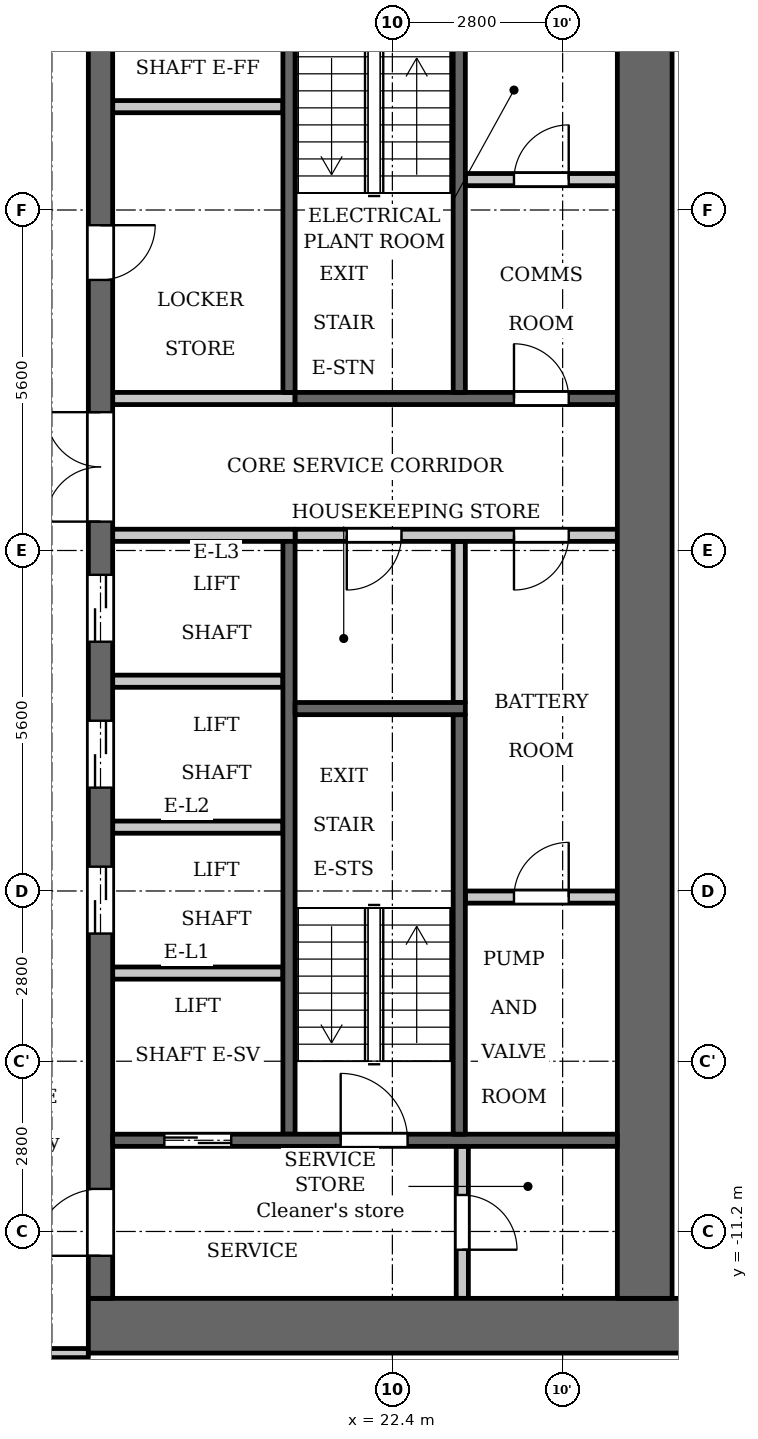
"""IFC4 building model, lengths in metres.
Left out: names, types, materials, properties, quantities, classifications, styles, units other than length and angle.
Written with IfcOpenShell. Run it as: python <this file> out.ifc"""

import sys

from ifc_helpers import new_model, si_unit, direction, frame, frame_2d, origin, place, context, subcontext, project, spatial, rectangle, extrude, element, fill, save


model = new_model("IFC4")
c1 = context("Model", 3, precision=1e-05, world=origin(), true_north=direction((0.0, 1.0)))
c2 = subcontext(c1, "Body", "Model", "MODEL_VIEW")
j1 = project(units=[si_unit("LENGTHUNIT", "METRE"), si_unit("PLANEANGLEUNIT", "RADIAN")], contexts=[c1])
p1 = place(None, origin())
s1 = spatial("IfcSite", under=j1, at=p1, CompositionType="ELEMENT")
p2 = place(p1, origin())
s2 = spatial("IfcBuilding", under=s1, at=p2, CompositionType="ELEMENT")
p3 = place(p2, frame((0.0, 0.0, 97.3)))
s3 = spatial("IfcBuildingStorey", under=s2, at=p3, CompositionType="ELEMENT", Elevation=97.3)
p4 = place(p3, frame((23.5, -2.5, 0.0), z_axis=(0.0, 0.0, 1.0), x_axis=(0.0, 1.0, 0.0)))
e1 = element("IfcWall", 1, at=p4, inside=s3, PredefinedType="PARTITIONING", context=c2, shape_type="SweptSolid", body=[
    extrude(rectangle(XDim=2.65, YDim=0.2, at=frame_2d((1.325, 0.0))), origin(), (0.0, 0.0, 1.0), 3.2),
])
p5 = place(p3, frame((20.7, 2.6, 0.0), z_axis=(0.0, 0.0, 1.0), x_axis=(0.0, 1.0, 0.0)))
e2 = element("IfcWall", 2, at=p5, inside=s3, PredefinedType="SHEAR", context=c2, shape_type="SweptSolid", body=[
    extrude(rectangle(XDim=7.0, YDim=0.2, at=frame_2d((3.5, 0.0))), origin(), (0.0, 0.0, 1.0), 3.2),
])
p6 = place(p3, frame((20.7, -9.6, 0.0), z_axis=(0.0, 0.0, 1.0), x_axis=(0.0, 1.0, 0.0)))
e3 = element("IfcWall", 3, at=p6, inside=s3, PredefinedType="SHEAR", context=c2, shape_type="SweptSolid", body=[
    extrude(rectangle(XDim=9.75, YDim=0.2, at=frame_2d((4.875, 0.0))), origin(), (0.0, 0.0, 1.0), 3.2),
])
p7 = place(p3, frame((20.8, 2.5, 0.0), z_axis=(0.0, 0.0, 1.0), x_axis=(1.0, 0.0, 0.0)))
e4 = element("IfcWall", 4, at=p7, inside=s3, PredefinedType="SHEAR", context=c2, shape_type="SweptSolid", body=[
    extrude(rectangle(XDim=5.3, YDim=0.2, at=frame_2d((2.65, 0.0))), origin(), (0.0, 0.0, 1.0), 3.2),
])
p8 = place(p7, frame((3.6, 0.0, 0.0)))
e5 = element("IfcOpeningElement", 5, at=p8, cuts=e4, PredefinedType="OPENING", context=c2, shape_type="SweptSolid", body=[
    extrude(rectangle(XDim=0.9, YDim=2.1, at=frame_2d((0.45, 1.05))), frame((0.0, 0.11, 0.0), z_axis=(0.0, -1.0, 0.0), x_axis=(1.0, 0.0, 0.0)), (0.0, 0.0, 1.0), 0.22),
])
p9 = place(p3, frame((20.8, 0.25, 0.0), z_axis=(0.0, 0.0, 1.0), x_axis=(1.0, 0.0, 0.0)))
e6 = element("IfcWall", 6, at=p9, inside=s3, PredefinedType="PARTITIONING", context=c2, shape_type="SweptSolid", body=[
    extrude(rectangle(XDim=5.3, YDim=0.2, at=frame_2d((2.65, 0.0))), origin(), (0.0, 0.0, 1.0), 3.2),
])
p10 = place(p9, frame((0.85, 0.0, 0.0)))
e7 = element("IfcOpeningElement", 7, at=p10, cuts=e6, PredefinedType="OPENING", context=c2, shape_type="SweptSolid", body=[
    extrude(rectangle(XDim=0.9, YDim=2.1, at=frame_2d((0.45, 1.05))), frame((0.0, 0.11, 0.0), z_axis=(0.0, -1.0, 0.0), x_axis=(1.0, 0.0, 0.0)), (0.0, 0.0, 1.0), 0.22),
])
p11 = place(p9, frame((3.6, 0.0, 0.0)))
e8 = element("IfcOpeningElement", 8, at=p11, cuts=e6, PredefinedType="OPENING", context=c2, shape_type="SweptSolid", body=[
    extrude(rectangle(XDim=0.9, YDim=2.1, at=frame_2d((0.45, 1.05))), frame((0.0, 0.11, 0.0), z_axis=(0.0, -1.0, 0.0), x_axis=(1.0, 0.0, 0.0)), (0.0, 0.0, 1.0), 0.22),
])
p12 = place(p3, frame((17.4, -12.75, 0.0), z_axis=(0.0, 0.0, 1.0), x_axis=(1.0, 0.0, 0.0)))
e9 = element("IfcWall", 9, at=p12, inside=s3, PredefinedType="SHEAR", context=c2, shape_type="SweptSolid", body=[
    extrude(rectangle(XDim=10.4, YDim=0.9, at=frame_2d((5.2, 0.0))), origin(), (0.0, 0.0, 1.0), 3.2),
])
p13 = place(p3, frame((17.6, -12.3, 0.0), z_axis=(0.0, 0.0, 1.0), x_axis=(0.0, 1.0, 0.0)))
e10 = element("IfcWall", 10, at=p13, inside=s3, PredefinedType="SHEAR", context=c2, shape_type="SweptSolid", body=[
    extrude(rectangle(XDim=24.6, YDim=0.4, at=frame_2d((12.3, 0.0))), origin(), (0.0, 0.0, 1.0), 3.2),
])
p14 = place(p13, frame((6.0, 0.0, 0.0)))
e11 = element("IfcOpeningElement", 11, at=p14, cuts=e10, PredefinedType="OPENING", context=c2, shape_type="SweptSolid", body=[
    extrude(rectangle(XDim=1.1, YDim=2.1, at=frame_2d((0.55, 1.05))), frame((0.0, 0.21, 0.0), z_axis=(0.0, -1.0, 0.0), x_axis=(1.0, 0.0, 0.0)), (0.0, 0.0, 1.0), 0.42),
])
p15 = place(p13, frame((8.4, 0.0, 0.0)))
e12 = element("IfcOpeningElement", 12, at=p15, cuts=e10, PredefinedType="OPENING", context=c2, shape_type="SweptSolid", body=[
    extrude(rectangle(XDim=1.1, YDim=2.1, at=frame_2d((0.55, 1.05))), frame((0.0, 0.21, 0.0), z_axis=(0.0, -1.0, 0.0), x_axis=(1.0, 0.0, 0.0)), (0.0, 0.0, 1.0), 0.42),
])
p16 = place(p13, frame((10.8, 0.0, 0.0)))
e13 = element("IfcOpeningElement", 13, at=p16, cuts=e10, PredefinedType="OPENING", context=c2, shape_type="SweptSolid", body=[
    extrude(rectangle(XDim=1.1, YDim=2.1, at=frame_2d((0.55, 1.05))), frame((0.0, 0.21, 0.0), z_axis=(0.0, -1.0, 0.0), x_axis=(1.0, 0.0, 0.0)), (0.0, 0.0, 1.0), 0.42),
])
p17 = place(p13, frame((16.75, 0.0, 0.0)))
e14 = element("IfcOpeningElement", 14, at=p17, cuts=e10, PredefinedType="OPENING", context=c2, shape_type="SweptSolid", body=[
    extrude(rectangle(XDim=0.9, YDim=2.1, at=frame_2d((0.45, 1.05))), frame((0.0, 0.21, 0.0), z_axis=(0.0, -1.0, 0.0), x_axis=(1.0, 0.0, 0.0)), (0.0, 0.0, 1.0), 0.42),
])
p18 = place(p13, frame((22.8, 0.0, 0.0)))
e15 = element("IfcOpeningElement", 15, at=p18, cuts=e10, PredefinedType="OPENING", context=c2, shape_type="SweptSolid", body=[
    extrude(rectangle(XDim=1.1, YDim=2.1, at=frame_2d((0.55, 1.05))), frame((0.0, 0.21, 0.0), z_axis=(0.0, -1.0, 0.0), x_axis=(1.0, 0.0, 0.0)), (0.0, 0.0, 1.0), 0.42),
])
p19 = place(p13, frame((0.7, 0.0, 0.0)))
e16 = element("IfcOpeningElement", 16, at=p19, cuts=e10, PredefinedType="OPENING", context=c2, shape_type="SweptSolid", body=[
    extrude(rectangle(XDim=1.1, YDim=2.1, at=frame_2d((0.55, 1.05))), frame((0.0, 0.21, 0.0), z_axis=(0.0, -1.0, 0.0), x_axis=(1.0, 0.0, 0.0)), (0.0, 0.0, 1.0), 0.42),
])
p20 = place(p13, frame((12.775, 0.0, 0.0)))
e17 = element("IfcOpeningElement", 17, at=p20, cuts=e10, PredefinedType="OPENING", context=c2, shape_type="SweptSolid", body=[
    extrude(rectangle(XDim=1.8, YDim=2.1, at=frame_2d((0.9, 1.05))), frame((0.0, 0.21, 0.0), z_axis=(0.0, -1.0, 0.0), x_axis=(1.0, 0.0, 0.0)), (0.0, 0.0, 1.0), 0.42),
])
p21 = place(p3, frame((26.55, -12.3, 0.0), z_axis=(0.0, 0.0, 1.0), x_axis=(0.0, 1.0, 0.0)))
e18 = element("IfcWall", 18, at=p21, inside=s3, PredefinedType="SHEAR", context=c2, shape_type="SweptSolid", body=[
    extrude(rectangle(XDim=24.6, YDim=0.9, at=frame_2d((12.3, 0.0))), origin(), (0.0, 0.0, 1.0), 3.2),
])
p22 = place(p3, frame((23.55, -12.3, 0.0), z_axis=(0.0, 0.0, 1.0), x_axis=(0.0, 1.0, 0.0)))
e19 = element("IfcWall", 19, at=p22, inside=s3, PredefinedType="PARTITIONING", context=c2, shape_type="SweptSolid", body=[
    extrude(rectangle(XDim=2.5, YDim=0.2, at=frame_2d((1.25, 0.0))), origin(), (0.0, 0.0, 1.0), 3.2),
])
p23 = place(p22, frame((0.8, 0.0, 0.0)))
e20 = element("IfcOpeningElement", 20, at=p23, cuts=e19, PredefinedType="OPENING", context=c2, shape_type="SweptSolid", body=[
    extrude(rectangle(XDim=0.9, YDim=2.1, at=frame_2d((0.45, 1.05))), frame((0.0, 0.11, 0.0), z_axis=(0.0, -1.0, 0.0), x_axis=(1.0, 0.0, 0.0)), (0.0, 0.0, 1.0), 0.22),
])
p24 = place(p3, frame((23.6, -5.7, 0.0), z_axis=(0.0, 0.0, 1.0), x_axis=(1.0, 0.0, 0.0)))
e21 = element("IfcWall", 21, at=p24, inside=s3, PredefinedType="PARTITIONING", context=c2, shape_type="SweptSolid", body=[
    extrude(rectangle(XDim=2.5, YDim=0.2, at=frame_2d((1.25, 0.0))), origin(), (0.0, 0.0, 1.0), 3.2),
])
p25 = place(p24, frame((0.8, 0.0, 0.0)))
e22 = element("IfcOpeningElement", 22, at=p25, cuts=e21, PredefinedType="OPENING", context=c2, shape_type="SweptSolid", body=[
    extrude(rectangle(XDim=0.9, YDim=2.1, at=frame_2d((0.45, 1.05))), frame((0.0, 0.11, 0.0), z_axis=(0.0, -1.0, 0.0), x_axis=(1.0, 0.0, 0.0)), (0.0, 0.0, 1.0), 0.22),
])
p26 = place(p3, frame((23.6, 6.1, 0.0), z_axis=(0.0, 0.0, 1.0), x_axis=(1.0, 0.0, 0.0)))
e23 = element("IfcWall", 23, at=p26, inside=s3, PredefinedType="PARTITIONING", context=c2, shape_type="SweptSolid", body=[
    extrude(rectangle(XDim=2.5, YDim=0.2, at=frame_2d((1.25, 0.0))), origin(), (0.0, 0.0, 1.0), 3.2),
])
p27 = place(p26, frame((0.8, 0.0, 0.0)))
e24 = element("IfcOpeningElement", 24, at=p27, cuts=e23, PredefinedType="OPENING", context=c2, shape_type="SweptSolid", body=[
    extrude(rectangle(XDim=0.9, YDim=2.1, at=frame_2d((0.45, 1.05))), frame((0.0, 0.11, 0.0), z_axis=(0.0, -1.0, 0.0), x_axis=(1.0, 0.0, 0.0)), (0.0, 0.0, 1.0), 0.22),
])
p28 = place(p3, frame((17.8, -9.7, 0.0), z_axis=(0.0, 0.0, 1.0), x_axis=(1.0, 0.0, 0.0)))
e25 = element("IfcWall", 25, at=p28, inside=s3, PredefinedType="SHEAR", context=c2, shape_type="SweptSolid", body=[
    extrude(rectangle(XDim=8.3, YDim=0.2, at=frame_2d((4.15, 0.0))), origin(), (0.0, 0.0, 1.0), 3.2),
])
p29 = place(p28, frame((0.85, 0.0, 0.0)))
e26 = element("IfcOpeningElement", 26, at=p29, cuts=e25, PredefinedType="OPENING", context=c2, shape_type="SweptSolid", body=[
    extrude(rectangle(XDim=1.1, YDim=2.1, at=frame_2d((0.55, 1.05))), frame((0.0, 0.11, 0.0), z_axis=(0.0, -1.0, 0.0), x_axis=(1.0, 0.0, 0.0)), (0.0, 0.0, 1.0), 0.22),
])
p30 = place(p28, frame((3.75, 0.0, 0.0)))
e27 = element("IfcOpeningElement", 27, at=p30, cuts=e25, PredefinedType="OPENING", context=c2, shape_type="SweptSolid", body=[
    extrude(rectangle(XDim=1.1, YDim=2.1, at=frame_2d((0.55, 1.05))), frame((0.0, 0.11, 0.0), z_axis=(0.0, -1.0, 0.0), x_axis=(1.0, 0.0, 0.0)), (0.0, 0.0, 1.0), 0.22),
])
for number, where, z_axis, x_axis in (
    (28, (17.8, -6.95, 0.0), (0.0, 0.0, 1.0), (1.0, 0.0, 0.0)),
    (29, (17.8, -4.55, 0.0), (0.0, 0.0, 1.0), (1.0, 0.0, 0.0)),
    (30, (17.8, -2.15, 0.0), (0.0, 0.0, 1.0), (1.0, 0.0, 0.0)),
):
    element("IfcWall", number, at=place(p3, frame(where, z_axis=z_axis, x_axis=x_axis)), inside=s3, PredefinedType="PARTITIONING", context=c2, shape_type="SweptSolid", body=[
        extrude(rectangle(XDim=2.8, YDim=0.2, at=frame_2d((1.4, 0.0))), origin(), (0.0, 0.0, 1.0), 3.2),
    ])
for number, where, z_axis, x_axis in (
    (31, (17.8, 0.25, 0.0), (0.0, 0.0, 1.0), (1.0, 0.0, 0.0)),
    (32, (17.8, 2.5, 0.0), (0.0, 0.0, 1.0), (1.0, 0.0, 0.0)),
):
    element("IfcWall", number, at=place(p3, frame(where, z_axis=z_axis, x_axis=x_axis)), inside=s3, PredefinedType="PARTITIONING", context=c2, shape_type="SweptSolid", body=[
        extrude(rectangle(XDim=3.0, YDim=0.2, at=frame_2d((1.5, 0.0))), origin(), (0.0, 0.0, 1.0), 3.2),
    ])
p31 = place(p3, frame((17.8, 7.3, 0.0), z_axis=(0.0, 0.0, 1.0), x_axis=(1.0, 0.0, 0.0)))
e33 = element("IfcWall", 33, at=p31, inside=s3, PredefinedType="PARTITIONING", context=c2, shape_type="SweptSolid", body=[
    extrude(rectangle(XDim=2.8, YDim=0.2, at=frame_2d((1.4, 0.0))), origin(), (0.0, 0.0, 1.0), 3.2),
])
p32 = place(p3, frame((23.5, 2.6, 0.0), z_axis=(0.0, 0.0, 1.0), x_axis=(0.0, 1.0, 0.0)))
e34 = element("IfcWall", 34, at=p32, inside=s3, PredefinedType="SHEAR", context=c2, shape_type="SweptSolid", body=[
    extrude(rectangle(XDim=7.0, YDim=0.2, at=frame_2d((3.5, 0.0))), origin(), (0.0, 0.0, 1.0), 3.2),
])
p33 = place(p3, frame((23.5, -9.6, 0.0), z_axis=(0.0, 0.0, 1.0), x_axis=(0.0, 1.0, 0.0)))
e35 = element("IfcWall", 35, at=p33, inside=s3, PredefinedType="SHEAR", context=c2, shape_type="SweptSolid", body=[
    extrude(rectangle(XDim=6.9, YDim=0.2, at=frame_2d((3.45, 0.0))), origin(), (0.0, 0.0, 1.0), 3.2),
])
p34 = place(p3, frame((20.8, -2.6, 0.0), z_axis=(0.0, 0.0, 1.0), x_axis=(1.0, 0.0, 0.0)))
e36 = element("IfcWall", 36, at=p34, inside=s3, PredefinedType="SHEAR", context=c2, shape_type="SweptSolid", body=[
    extrude(rectangle(XDim=2.8, YDim=0.2, at=frame_2d((1.4, 0.0))), origin(), (0.0, 0.0, 1.0), 3.2),
])
p35 = place(p3, frame((-17.4, -13.2, 0.0), z_axis=(0.0, 0.0, 1.0), x_axis=(1.0, 0.0, 0.0)))
e37 = element("IfcWall", 37, at=p35, inside=s3, PredefinedType="PARTITIONING", context=c2, shape_type="SweptSolid", body=[
    extrude(rectangle(XDim=34.8, YDim=0.15, at=frame_2d((17.4, 0.0))), origin(), (0.0, 0.0, 1.0), 3.2),
])
p36 = place(p35, frame((0.65, 0.0, 0.0)))
e38 = element("IfcOpeningElement", 38, at=p36, cuts=e37, PredefinedType="OPENING", context=c2, shape_type="SweptSolid", body=[
    extrude(rectangle(XDim=1.0, YDim=2.1, at=frame_2d((0.5, 1.05))), frame((0.0, 0.085, 0.0), z_axis=(0.0, -1.0, 0.0), x_axis=(1.0, 0.0, 0.0)), (0.0, 0.0, 1.0), 0.17),
])
p37 = place(p35, frame((33.05, 0.0, 0.0)))
e39 = element("IfcOpeningElement", 39, at=p37, cuts=e37, PredefinedType="OPENING", context=c2, shape_type="SweptSolid", body=[
    extrude(rectangle(XDim=1.0, YDim=2.1, at=frame_2d((0.5, 1.05))), frame((0.0, 0.085, 0.0), z_axis=(0.0, -1.0, 0.0), x_axis=(1.0, 0.0, 0.0)), (0.0, 0.0, 1.0), 0.17),
])
p38 = place(p35, frame((4.55, 0.0, 0.0)))
e40 = element("IfcOpeningElement", 40, at=p38, cuts=e37, PredefinedType="OPENING", context=c2, shape_type="SweptSolid", body=[
    extrude(rectangle(XDim=1.0, YDim=2.1, at=frame_2d((0.5, 1.05))), frame((0.0, 0.085, 0.0), z_axis=(0.0, -1.0, 0.0), x_axis=(1.0, 0.0, 0.0)), (0.0, 0.0, 1.0), 0.17),
])
p39 = place(p35, frame((21.35, 0.0, 0.0)))
e41 = element("IfcOpeningElement", 41, at=p39, cuts=e37, PredefinedType="OPENING", context=c2, shape_type="SweptSolid", body=[
    extrude(rectangle(XDim=1.0, YDim=2.1, at=frame_2d((0.5, 1.05))), frame((0.0, 0.085, 0.0), z_axis=(0.0, -1.0, 0.0), x_axis=(1.0, 0.0, 0.0)), (0.0, 0.0, 1.0), 0.17),
])
p40 = place(p35, frame((30.75, 0.0, 0.0)))
e42 = element("IfcOpeningElement", 42, at=p40, cuts=e37, PredefinedType="OPENING", context=c2, shape_type="SweptSolid", body=[
    extrude(rectangle(XDim=1.0, YDim=2.1, at=frame_2d((0.5, 1.05))), frame((0.0, 0.085, 0.0), z_axis=(0.0, -1.0, 0.0), x_axis=(1.0, 0.0, 0.0)), (0.0, 0.0, 1.0), 0.17),
])
p41 = place(p29, origin())
e43 = element("IfcDoor", 43, at=p41, inside=s3, OperationType="DOUBLE_DOOR_SLIDING", PredefinedType="DOOR", context=c2, shape_type="SweptSolid", body=[
    extrude(rectangle(XDim=1.1, YDim=2.1, at=frame_2d((0.55, 1.05))), frame((0.0, 0.025, 0.0), z_axis=(0.0, -1.0, 0.0), x_axis=(1.0, 0.0, 0.0)), (0.0, 0.0, 1.0), 0.05),
])
fill(e26, e43)
p42 = place(p14, origin())
e44 = element("IfcDoor", 44, at=p42, inside=s3, OperationType="DOUBLE_DOOR_SLIDING", PredefinedType="DOOR", context=c2, shape_type="SweptSolid", body=[
    extrude(rectangle(XDim=1.1, YDim=2.1, at=frame_2d((0.55, 1.05))), frame((0.0, 0.025, 0.0), z_axis=(0.0, -1.0, 0.0), x_axis=(1.0, 0.0, 0.0)), (0.0, 0.0, 1.0), 0.05),
])
fill(e11, e44)
p43 = place(p15, origin())
e45 = element("IfcDoor", 45, at=p43, inside=s3, OperationType="DOUBLE_DOOR_SLIDING", PredefinedType="DOOR", context=c2, shape_type="SweptSolid", body=[
    extrude(rectangle(XDim=1.1, YDim=2.1, at=frame_2d((0.55, 1.05))), frame((0.0, 0.025, 0.0), z_axis=(0.0, -1.0, 0.0), x_axis=(1.0, 0.0, 0.0)), (0.0, 0.0, 1.0), 0.05),
])
fill(e12, e45)
p44 = place(p16, origin())
e46 = element("IfcDoor", 46, at=p44, inside=s3, OperationType="DOUBLE_DOOR_SLIDING", PredefinedType="DOOR", context=c2, shape_type="SweptSolid", body=[
    extrude(rectangle(XDim=1.1, YDim=2.1, at=frame_2d((0.55, 1.05))), frame((0.0, 0.025, 0.0), z_axis=(0.0, -1.0, 0.0), x_axis=(1.0, 0.0, 0.0)), (0.0, 0.0, 1.0), 0.05),
])
fill(e13, e46)
p45 = place(p17, origin())
e47 = element("IfcDoor", 47, at=p45, inside=s3, OperationType="SINGLE_SWING_RIGHT", PredefinedType="DOOR", context=c2, shape_type="SweptSolid", body=[
    extrude(rectangle(XDim=0.9, YDim=2.1, at=frame_2d((0.45, 1.05))), frame((0.0, 0.025, 0.0), z_axis=(0.0, -1.0, 0.0), x_axis=(1.0, 0.0, 0.0)), (0.0, 0.0, 1.0), 0.05),
])
fill(e14, e47)
p46 = place(p19, origin())
e48 = element("IfcDoor", 48, at=p46, inside=s3, OperationType="SINGLE_SWING_RIGHT", PredefinedType="DOOR", context=c2, shape_type="SweptSolid", body=[
    extrude(rectangle(XDim=1.1, YDim=2.1, at=frame_2d((0.55, 1.05))), frame((0.0, 0.025, 0.0), z_axis=(0.0, -1.0, 0.0), x_axis=(1.0, 0.0, 0.0)), (0.0, 0.0, 1.0), 0.05),
])
fill(e16, e48)
p47 = place(p23, origin())
e49 = element("IfcDoor", 49, at=p47, inside=s3, OperationType="SINGLE_SWING_LEFT", PredefinedType="DOOR", context=c2, shape_type="SweptSolid", body=[
    extrude(rectangle(XDim=0.9, YDim=2.1, at=frame_2d((0.45, 1.05))), frame((0.0, 0.025, 0.0), z_axis=(0.0, -1.0, 0.0), x_axis=(1.0, 0.0, 0.0)), (0.0, 0.0, 1.0), 0.05),
])
fill(e20, e49)
p48 = place(p30, origin())
e50 = element("IfcDoor", 50, at=p48, inside=s3, OperationType="SINGLE_SWING_RIGHT", PredefinedType="DOOR", context=c2, shape_type="SweptSolid", body=[
    extrude(rectangle(XDim=1.1, YDim=2.1, at=frame_2d((0.55, 1.05))), frame((0.0, 0.025, 0.0), z_axis=(0.0, -1.0, 0.0), x_axis=(1.0, 0.0, 0.0)), (0.0, 0.0, 1.0), 0.05),
])
fill(e27, e50)
p49 = place(p20, origin())
e51 = element("IfcDoor", 51, at=p49, inside=s3, OperationType="DOUBLE_DOOR_SINGLE_SWING", PredefinedType="DOOR", context=c2, shape_type="SweptSolid", body=[
    extrude(rectangle(XDim=1.8, YDim=2.1, at=frame_2d((0.9, 1.05))), frame((0.0, 0.025, 0.0), z_axis=(0.0, -1.0, 0.0), x_axis=(1.0, 0.0, 0.0)), (0.0, 0.0, 1.0), 0.05),
])
fill(e17, e51)
p50 = place(p10, origin())
e52 = element("IfcDoor", 52, at=p50, inside=s3, OperationType="SINGLE_SWING_LEFT", PredefinedType="DOOR", context=c2, shape_type="SweptSolid", body=[
    extrude(rectangle(XDim=0.9, YDim=2.1, at=frame_2d((0.45, 1.05))), frame((0.0, 0.025, 0.0), z_axis=(0.0, -1.0, 0.0), x_axis=(1.0, 0.0, 0.0)), (0.0, 0.0, 1.0), 0.05),
])
fill(e7, e52)
p51 = place(p25, origin())
e53 = element("IfcDoor", 53, at=p51, inside=s3, OperationType="SINGLE_SWING_LEFT", PredefinedType="DOOR", context=c2, shape_type="SweptSolid", body=[
    extrude(rectangle(XDim=0.9, YDim=2.1, at=frame_2d((0.45, 1.05))), frame((0.0, 0.025, 0.0), z_axis=(0.0, -1.0, 0.0), x_axis=(1.0, 0.0, 0.0)), (0.0, 0.0, 1.0), 0.05),
])
fill(e22, e53)
p52 = place(p11, origin())
e54 = element("IfcDoor", 54, at=p52, inside=s3, OperationType="SINGLE_SWING_LEFT", PredefinedType="DOOR", context=c2, shape_type="SweptSolid", body=[
    extrude(rectangle(XDim=0.9, YDim=2.1, at=frame_2d((0.45, 1.05))), frame((0.0, 0.025, 0.0), z_axis=(0.0, -1.0, 0.0), x_axis=(1.0, 0.0, 0.0)), (0.0, 0.0, 1.0), 0.05),
])
fill(e8, e54)
p53 = place(p27, origin())
e55 = element("IfcDoor", 55, at=p53, inside=s3, OperationType="SINGLE_SWING_LEFT", PredefinedType="DOOR", context=c2, shape_type="SweptSolid", body=[
    extrude(rectangle(XDim=0.9, YDim=2.1, at=frame_2d((0.45, 1.05))), frame((0.0, 0.025, 0.0), z_axis=(0.0, -1.0, 0.0), x_axis=(1.0, 0.0, 0.0)), (0.0, 0.0, 1.0), 0.05),
])
fill(e24, e55)
p54 = place(p8, origin())
e56 = element("IfcDoor", 56, at=p54, inside=s3, OperationType="SINGLE_SWING_RIGHT", PredefinedType="DOOR", context=c2, shape_type="SweptSolid", body=[
    extrude(rectangle(XDim=0.9, YDim=2.1, at=frame_2d((0.45, 1.05))), frame((0.0, 0.025, 0.0), z_axis=(0.0, -1.0, 0.0), x_axis=(1.0, 0.0, 0.0)), (0.0, 0.0, 1.0), 0.05),
])
fill(e5, e56)
save(model, sys.argv[1])
